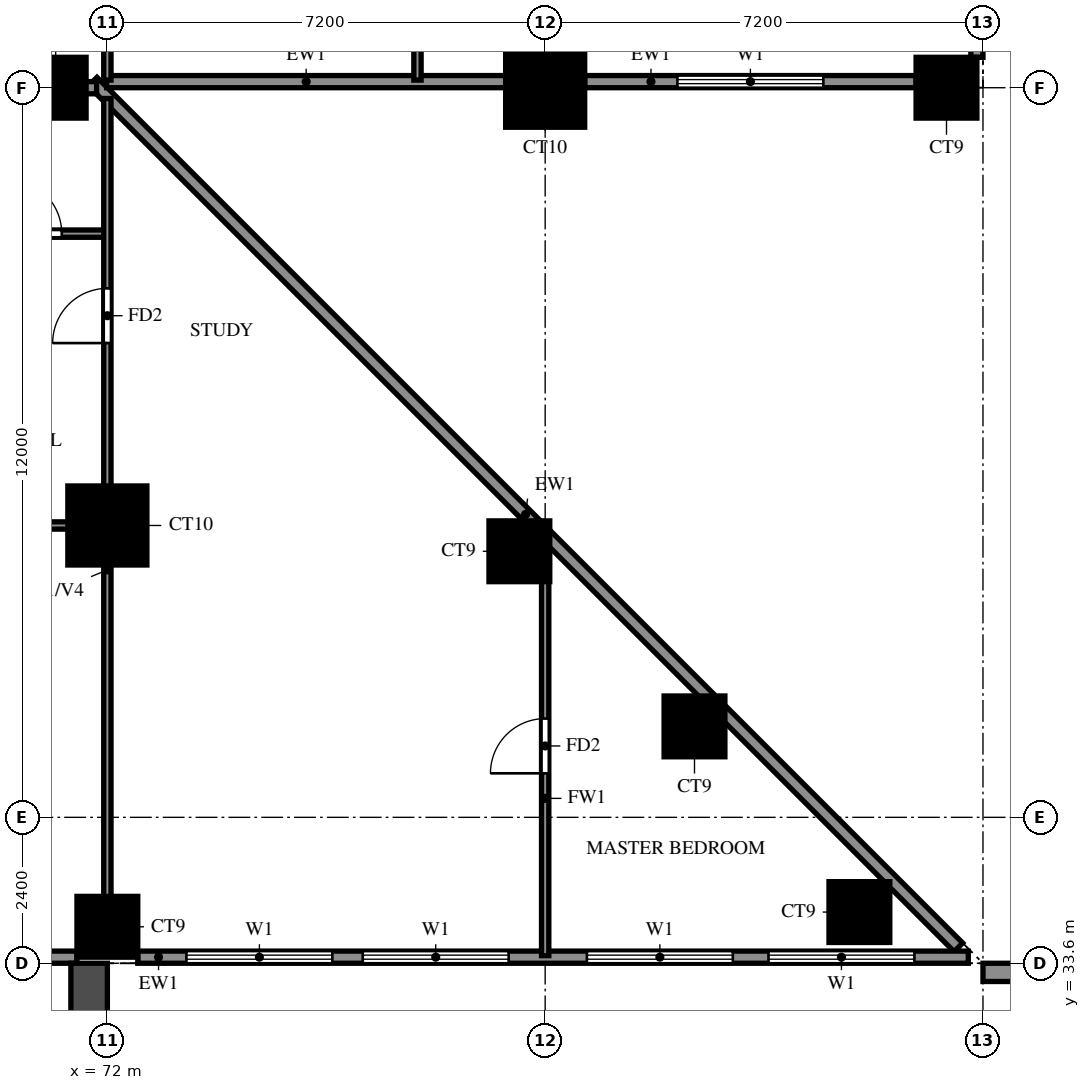
"""IFC4 building model, lengths in metres.
Left out: names, types, materials, properties, quantities, classifications, styles, units other than length and angle.
Written with IfcOpenShell. Run it as: python <this file> out.ifc"""

import sys

from ifc_helpers import new_model, si_unit, direction, frame, frame_2d, origin, origin_2d, place, context, subcontext, project, spatial, rectangle, extrude, source, transform, mapped, element, fill, save


model = new_model("IFC4")
c1 = context("Model", 3, precision=1e-05, world=origin(), true_north=direction((0.0, 1.0)))
c2 = subcontext(c1, "Body", "Model", "MODEL_VIEW")
j1 = project(units=[si_unit("LENGTHUNIT", "METRE"), si_unit("PLANEANGLEUNIT", "RADIAN")], contexts=[c1])
p1 = place(None, origin())
s1 = spatial("IfcSite", under=j1, at=p1, CompositionType="ELEMENT")
p2 = place(p1, origin())
s2 = spatial("IfcBuilding", under=s1, at=p2, CompositionType="ELEMENT")
p3 = place(p2, frame((0.0, 0.0, 65.5)))
s3 = spatial("IfcBuildingStorey", under=s2, at=p3, CompositionType="ELEMENT", Elevation=65.5)
m1 = source(origin(), c2, "Body", "SweptSolid", [
    extrude(rectangle(XDim=1.0, YDim=1.0, at=origin_2d()), origin(), (0.0, 0.0, 1.0), 3.18),
])
for number, where, z_axis, x_axis in (
    (1, (72.0, 34.2, 0.0), (0.0, 0.0, 1.0), (1.0, 0.0, 0.0)),
    (2, (84.367, 34.442, 0.0), (0.0, 0.0, 1.0), (1.0, 0.0, 0.0)),
    (3, (81.656, 37.496, 0.0), (0.0, 0.0, 1.0), (1.0, 0.0, 0.0)),
    (4, (78.776, 40.376, 0.0), (0.0, 0.0, 1.0), (1.0, 0.0, 0.0)),
):
    element("IfcColumn", number, at=place(p3, frame(where, z_axis=z_axis, x_axis=x_axis)), inside=s3, PredefinedType="COLUMN", context=c2, shape_type="MappedRepresentation", body=[
        mapped(m1, transform((0.0, 0.0, 0.0))),
    ])
m2 = source(origin(), c2, "Body", "SweptSolid", [
    extrude(rectangle(XDim=1.3, YDim=1.3, at=origin_2d()), origin(), (0.0, 0.0, 1.0), 3.18),
])
p4 = place(p3, frame((72.0, 40.8, 0.0), z_axis=(0.0, 0.0, 1.0), x_axis=(1.0, 0.0, 0.0)))
e5 = element("IfcColumn", 5, at=p4, inside=s3, PredefinedType="COLUMN", context=c2, shape_type="MappedRepresentation", body=[
    mapped(m2, transform((0.0, 0.0, 0.0))),
])
p5 = place(p3, frame((71.15, 48.0, 0.0), z_axis=(0.0, 0.0, 1.0), x_axis=(1.0, 0.0, 0.0)))
e6 = element("IfcColumn", 6, at=p5, inside=s3, PredefinedType="COLUMN", context=c2, shape_type="MappedRepresentation", body=[
    mapped(m1, transform((0.0, 0.0, 0.0))),
])
p6 = place(p3, frame((79.2, 48.0, 0.0), z_axis=(0.0, 0.0, 1.0), x_axis=(1.0, 0.0, 0.0)))
e7 = element("IfcColumn", 7, at=p6, inside=s3, PredefinedType="COLUMN", context=c2, shape_type="MappedRepresentation", body=[
    mapped(m2, transform((0.0, 0.0, 0.0))),
])
p7 = place(p3, frame((85.8, 48.0, 0.0), z_axis=(0.0, 0.0, 1.0), x_axis=(1.0, 0.0, 0.0)))
e8 = element("IfcColumn", 8, at=p7, inside=s3, PredefinedType="COLUMN", context=c2, shape_type="MappedRepresentation", body=[
    mapped(m1, transform((0.0, 0.0, 0.0))),
])
p8 = place(p3, frame((85.996, 33.863, 0.0), z_axis=(0.0, 0.0, 1.0), x_axis=(-0.707100718496, 0.707112843825, 0.0)))
e9 = element("IfcWall", 9, at=p8, inside=s3, PredefinedType="SOLIDWALL", context=c2, shape_type="SweptSolid", body=[
    extrude(rectangle(XDim=20.135, YDim=0.2, at=frame_2d((10.067, 0.0))), origin(), (0.0, 0.0, 1.0), 3.18),
])
p9 = place(p3, frame((71.989, 48.1, 0.0), z_axis=(0.0, 0.0, 1.0), x_axis=(1.0, 0.0, 0.0)))
e10 = element("IfcWall", 10, at=p9, inside=s3, PredefinedType="SOLIDWALL", context=c2, shape_type="SweptSolid", body=[
    extrude(rectangle(XDim=6.562, YDim=0.2, at=frame_2d((3.281, 0.0))), origin(), (0.0, 0.0, 1.0), 3.18),
])
p10 = place(p3, frame((79.85, 48.1, 0.0), z_axis=(0.0, 0.0, 1.0), x_axis=(1.0, 0.0, 0.0)))
e11 = element("IfcWall", 11, at=p10, inside=s3, PredefinedType="SOLIDWALL", context=c2, shape_type="SweptSolid", body=[
    extrude(rectangle(XDim=5.45, YDim=0.2, at=frame_2d((2.725, 0.0))), origin(), (0.0, 0.0, 1.0), 3.18),
])
p11 = place(p10, frame((1.525, 0.0, 0.6)))
e12 = element("IfcOpeningElement", 12, at=p11, cuts=e11, PredefinedType="OPENING", context=c2, shape_type="SweptSolid", body=[
    extrude(rectangle(XDim=2.4, YDim=2.4, at=frame_2d((1.2, 1.2))), frame((0.0, 0.11, 0.0), z_axis=(0.0, -1.0, 0.0), x_axis=(1.0, 0.0, 0.0)), (0.0, 0.0, 1.0), 0.22),
])
p12 = place(p3, frame((86.3, 48.5, 0.0), z_axis=(0.0, 0.0, 1.0), x_axis=(0.0, 1.0, 0.0)))
e13 = element("IfcWall", 13, at=p12, inside=s3, PredefinedType="SOLIDWALL", context=c2, shape_type="SweptSolid", body=[
    extrude(rectangle(XDim=6.2, YDim=0.2, at=frame_2d((3.1, 0.0))), origin(), (0.0, 0.0, 1.0), 3.18),
])
p13 = place(p12, frame((4.0, 0.0, 0.0)))
e14 = element("IfcOpeningElement", 14, at=p13, cuts=e13, PredefinedType="OPENING", context=c2, shape_type="SweptSolid", body=[
    extrude(rectangle(XDim=1.8, YDim=2.4, at=frame_2d((0.9, 1.2))), frame((0.0, 0.11, 0.0), z_axis=(0.0, -1.0, 0.0), x_axis=(1.0, 0.0, 0.0)), (0.0, 0.0, 1.0), 0.22),
])
p14 = place(p12, frame((0.45, 0.0, 0.6)))
e15 = element("IfcOpeningElement", 15, at=p14, cuts=e13, PredefinedType="OPENING", context=c2, shape_type="SweptSolid", body=[
    extrude(rectangle(XDim=1.2, YDim=2.4, at=frame_2d((0.6, 1.2))), frame((0.0, 0.11, 0.0), z_axis=(0.0, -1.0, 0.0), x_axis=(1.0, 0.0, 0.0)), (0.0, 0.0, 1.0), 0.22),
])
p15 = place(p3, frame((65.3, 33.7, 0.0), z_axis=(0.0, 0.0, 1.0), x_axis=(1.0, 0.0, 0.0)))
e16 = element("IfcWall", 16, at=p15, inside=s3, PredefinedType="SOLIDWALL", context=c2, shape_type="SweptSolid", body=[
    extrude(rectangle(XDim=6.2, YDim=0.2, at=frame_2d((3.1, 0.0))), origin(), (0.0, 0.0, 1.0), 3.18),
])
p16 = place(p15, frame((2.2, 0.0, 0.0)))
e17 = element("IfcOpeningElement", 17, at=p16, cuts=e16, PredefinedType="OPENING", context=c2, shape_type="SweptSolid", body=[
    extrude(rectangle(XDim=1.8, YDim=2.4, at=frame_2d((0.9, 1.2))), frame((0.0, 0.11, 0.0), z_axis=(0.0, -1.0, 0.0), x_axis=(1.0, 0.0, 0.0)), (0.0, 0.0, 1.0), 0.22),
])
p17 = place(p15, frame((0.45, 0.0, 0.6)))
e18 = element("IfcOpeningElement", 18, at=p17, cuts=e16, PredefinedType="OPENING", context=c2, shape_type="SweptSolid", body=[
    extrude(rectangle(XDim=1.2, YDim=2.4, at=frame_2d((0.6, 1.2))), frame((0.0, 0.11, 0.0), z_axis=(0.0, -1.0, 0.0), x_axis=(1.0, 0.0, 0.0)), (0.0, 0.0, 1.0), 0.22),
])
p18 = place(p15, frame((4.55, 0.0, 0.6)))
e19 = element("IfcOpeningElement", 19, at=p18, cuts=e16, PredefinedType="OPENING", context=c2, shape_type="SweptSolid", body=[
    extrude(rectangle(XDim=1.2, YDim=2.4, at=frame_2d((0.6, 1.2))), frame((0.0, 0.11, 0.0), z_axis=(0.0, -1.0, 0.0), x_axis=(1.0, 0.0, 0.0)), (0.0, 0.0, 1.0), 0.22),
])
p19 = place(p3, frame((72.5, 33.7, 0.0), z_axis=(0.0, 0.0, 1.0), x_axis=(1.0, 0.0, 0.0)))
e20 = element("IfcWall", 20, at=p19, inside=s3, PredefinedType="SOLIDWALL", context=c2, shape_type="SweptSolid", body=[
    extrude(rectangle(XDim=13.659, YDim=0.2, at=frame_2d((6.829, 0.0))), origin(), (0.0, 0.0, 1.0), 3.18),
])
p20 = place(p19, frame((0.8, 0.0, 0.6)))
e21 = element("IfcOpeningElement", 21, at=p20, cuts=e20, PredefinedType="OPENING", context=c2, shape_type="SweptSolid", body=[
    extrude(rectangle(XDim=2.4, YDim=2.4, at=frame_2d((1.2, 1.2))), frame((0.0, 0.11, 0.0), z_axis=(0.0, -1.0, 0.0), x_axis=(1.0, 0.0, 0.0)), (0.0, 0.0, 1.0), 0.22),
])
p21 = place(p19, frame((3.7, 0.0, 0.6)))
e22 = element("IfcOpeningElement", 22, at=p21, cuts=e20, PredefinedType="OPENING", context=c2, shape_type="SweptSolid", body=[
    extrude(rectangle(XDim=2.4, YDim=2.4, at=frame_2d((1.2, 1.2))), frame((0.0, 0.11, 0.0), z_axis=(0.0, -1.0, 0.0), x_axis=(1.0, 0.0, 0.0)), (0.0, 0.0, 1.0), 0.22),
])
p22 = place(p19, frame((7.386, 0.0, 0.6)))
e23 = element("IfcOpeningElement", 23, at=p22, cuts=e20, PredefinedType="OPENING", context=c2, shape_type="SweptSolid", body=[
    extrude(rectangle(XDim=2.4, YDim=2.4, at=frame_2d((1.2, 1.2))), frame((0.0, 0.11, 0.0), z_axis=(0.0, -1.0, 0.0), x_axis=(1.0, 0.0, 0.0)), (0.0, 0.0, 1.0), 0.22),
])
p23 = place(p19, frame((10.372, 0.0, 0.6)))
e24 = element("IfcOpeningElement", 24, at=p23, cuts=e20, PredefinedType="OPENING", context=c2, shape_type="SweptSolid", body=[
    extrude(rectangle(XDim=2.4, YDim=2.4, at=frame_2d((1.2, 1.2))), frame((0.0, 0.11, 0.0), z_axis=(0.0, -1.0, 0.0), x_axis=(1.0, 0.0, 0.0)), (0.0, 0.0, 1.0), 0.22),
])
p24 = place(p3, frame((86.4, 33.45, -0.32), z_axis=(0.0, 0.0, 1.0), x_axis=(1.0, 0.0, 0.0)))
e25 = element("IfcWall", 25, at=p24, inside=s3, PredefinedType="SOLIDWALL", context=c2, shape_type="SweptSolid", body=[
    extrude(rectangle(XDim=2.4, YDim=0.3, at=frame_2d((1.2, 0.0))), origin(), (0.0, 0.0, 1.0), 3.5),
])
p25 = place(p3, frame((71.7, 33.6, 0.0), z_axis=(0.0, 0.0, 1.0), x_axis=(0.0, -1.0, 0.0)))
e26 = element("IfcWall", 26, at=p25, inside=s3, PredefinedType="SOLIDWALL", context=c2, shape_type="SweptSolid", body=[
    extrude(rectangle(XDim=2.7, YDim=0.6, at=frame_2d((1.35, 0.0))), origin(), (0.0, 0.0, 1.0), 2.85),
])
p26 = place(p3, frame((67.2, 48.0, 0.0), z_axis=(0.0, 0.0, 1.0), x_axis=(1.0, 0.0, 0.0)))
e27 = element("IfcWall", 27, at=p26, inside=s3, PredefinedType="SOLIDWALL", context=c2, shape_type="SweptSolid", body=[
    extrude(rectangle(XDim=4.623, YDim=0.2, at=frame_2d((2.312, 0.0))), origin(), (0.0, 0.0, 1.0), 3.18),
])
p27 = place(p3, frame((60.0, 40.8, 0.0), z_axis=(0.0, 0.0, 1.0), x_axis=(1.0, 0.0, 0.0)))
e28 = element("IfcWall", 28, at=p27, inside=s3, PredefinedType="PARTITIONING", context=c2, shape_type="SweptSolid", body=[
    extrude(rectangle(XDim=12.0, YDim=0.12, at=frame_2d((6.0, 0.0))), origin(), (0.0, 0.0, 1.0), 3.18),
])
p28 = place(p27, frame((7.65, 0.0, 0.0)))
e29 = element("IfcOpeningElement", 29, at=p28, cuts=e28, PredefinedType="OPENING", context=c2, shape_type="SweptSolid", body=[
    extrude(rectangle(XDim=1.5, YDim=2.1, at=frame_2d((0.75, 1.05))), frame((0.0, 0.07, 0.0), z_axis=(0.0, -1.0, 0.0), x_axis=(1.0, 0.0, 0.0)), (0.0, 0.0, 1.0), 0.14),
])
p29 = place(p27, frame((1.95, 0.0, 0.0)))
e30 = element("IfcOpeningElement", 30, at=p29, cuts=e28, PredefinedType="OPENING", context=c2, shape_type="SweptSolid", body=[
    extrude(rectangle(XDim=0.9, YDim=2.1, at=frame_2d((0.45, 1.05))), frame((0.0, 0.07, 0.0), z_axis=(0.0, -1.0, 0.0), x_axis=(1.0, 0.0, 0.0)), (0.0, 0.0, 1.0), 0.14),
])
p30 = place(p3, frame((67.2, 45.6, 0.0), z_axis=(0.0, 0.0, 1.0), x_axis=(1.0, 0.0, 0.0)))
e31 = element("IfcWall", 31, at=p30, inside=s3, PredefinedType="PARTITIONING", context=c2, shape_type="SweptSolid", body=[
    extrude(rectangle(XDim=4.8, YDim=0.12, at=frame_2d((2.4, 0.0))), origin(), (0.0, 0.0, 1.0), 3.18),
])
p31 = place(p30, frame((3.15, 0.0, 0.0)))
e32 = element("IfcOpeningElement", 32, at=p31, cuts=e31, PredefinedType="OPENING", context=c2, shape_type="SweptSolid", body=[
    extrude(rectangle(XDim=0.9, YDim=2.1, at=frame_2d((0.45, 1.05))), frame((0.0, 0.07, 0.0), z_axis=(0.0, -1.0, 0.0), x_axis=(1.0, 0.0, 0.0)), (0.0, 0.0, 1.0), 0.14),
])
p32 = place(p3, frame((72.0, 33.725, 0.0), z_axis=(0.0, 0.0, 1.0), x_axis=(0.0, 1.0, 0.0)))
e33 = element("IfcWall", 33, at=p32, inside=s3, PredefinedType="PARTITIONING", context=c2, shape_type="SweptSolid", body=[
    extrude(rectangle(XDim=14.098, YDim=0.12, at=frame_2d((7.049, 0.0))), origin(), (0.0, 0.0, 1.0), 2.28),
])
p33 = place(p32, frame((10.075, 0.0, 0.0)))
e34 = element("IfcOpeningElement", 34, at=p33, cuts=e33, PredefinedType="OPENING", context=c2, shape_type="SweptSolid", body=[
    extrude(rectangle(XDim=0.9, YDim=2.1, at=frame_2d((0.45, 1.05))), frame((0.0, 0.07, 0.0), z_axis=(0.0, -1.0, 0.0), x_axis=(1.0, 0.0, 0.0)), (0.0, 0.0, 1.0), 0.14),
])
p34 = place(p3, frame((72.0, 48.125, 0.0), z_axis=(0.0, 0.0, 1.0), x_axis=(0.0, 1.0, 0.0)))
e35 = element("IfcWall", 35, at=p34, inside=s3, PredefinedType="PARTITIONING", context=c2, shape_type="SweptSolid", body=[
    extrude(rectangle(XDim=7.075, YDim=0.12, at=frame_2d((3.538, 0.0))), origin(), (0.0, 0.0, 1.0), 3.18),
])
p35 = place(p3, frame((77.1, 48.125, 0.0), z_axis=(0.0, 0.0, 1.0), x_axis=(0.0, 1.0, 0.0)))
e36 = element("IfcWall", 36, at=p35, inside=s3, PredefinedType="PARTITIONING", context=c2, shape_type="SweptSolid", body=[
    extrude(rectangle(XDim=7.075, YDim=0.12, at=frame_2d((3.538, 0.0))), origin(), (0.0, 0.0, 1.0), 3.18),
])
p36 = place(p35, frame((3.087, 0.0, 0.0)))
e37 = element("IfcOpeningElement", 37, at=p36, cuts=e36, PredefinedType="OPENING", context=c2, shape_type="SweptSolid", body=[
    extrude(rectangle(XDim=0.9, YDim=2.1, at=frame_2d((0.45, 1.05))), frame((0.0, 0.07, 0.0), z_axis=(0.0, -1.0, 0.0), x_axis=(1.0, 0.0, 0.0)), (0.0, 0.0, 1.0), 0.14),
])
p37 = place(p3, frame((79.2, 33.725, 0.0), z_axis=(0.0, 0.0, 1.0), x_axis=(0.0, 1.0, 0.0)))
e38 = element("IfcWall", 38, at=p37, inside=s3, PredefinedType="PARTITIONING", context=c2, shape_type="SweptSolid", body=[
    extrude(rectangle(XDim=6.898, YDim=0.12, at=frame_2d((3.449, 0.0))), origin(), (0.0, 0.0, 1.0), 3.18),
])
p38 = place(p37, frame((2.999, 0.0, 0.0)))
e39 = element("IfcOpeningElement", 39, at=p38, cuts=e38, PredefinedType="OPENING", context=c2, shape_type="SweptSolid", body=[
    extrude(rectangle(XDim=0.9, YDim=2.1, at=frame_2d((0.45, 1.05))), frame((0.0, 0.07, 0.0), z_axis=(0.0, -1.0, 0.0), x_axis=(1.0, 0.0, 0.0)), (0.0, 0.0, 1.0), 0.14),
])
p39 = place(p3, frame((79.2, 48.125, 0.0), z_axis=(0.0, 0.0, 1.0), x_axis=(0.0, 1.0, 0.0)))
e40 = element("IfcWall", 40, at=p39, inside=s3, PredefinedType="PARTITIONING", context=c2, shape_type="SweptSolid", body=[
    extrude(rectangle(XDim=21.475, YDim=0.12, at=frame_2d((10.738, 0.0))), origin(), (0.0, 0.0, 1.0), 3.18),
])
p40 = place(p39, frame((1.288, 0.0, 0.0)))
e41 = element("IfcOpeningElement", 41, at=p40, cuts=e40, PredefinedType="OPENING", context=c2, shape_type="SweptSolid", body=[
    extrude(rectangle(XDim=0.9, YDim=2.1, at=frame_2d((0.45, 1.05))), frame((0.0, 0.07, 0.0), z_axis=(0.0, -1.0, 0.0), x_axis=(1.0, 0.0, 0.0)), (0.0, 0.0, 1.0), 0.14),
])
p41 = place(p39, frame((4.825, 0.0, 0.0)))
e42 = element("IfcOpeningElement", 42, at=p41, cuts=e40, PredefinedType="OPENING", context=c2, shape_type="SweptSolid", body=[
    extrude(rectangle(XDim=0.9, YDim=2.1, at=frame_2d((0.45, 1.05))), frame((0.0, 0.07, 0.0), z_axis=(0.0, -1.0, 0.0), x_axis=(1.0, 0.0, 0.0)), (0.0, 0.0, 1.0), 0.14),
])
p42 = place(p39, frame((9.925, 0.0, 0.0)))
e43 = element("IfcOpeningElement", 43, at=p42, cuts=e40, PredefinedType="OPENING", context=c2, shape_type="SweptSolid", body=[
    extrude(rectangle(XDim=1.5, YDim=2.1, at=frame_2d((0.75, 1.05))), frame((0.0, 0.07, 0.0), z_axis=(0.0, -1.0, 0.0), x_axis=(1.0, 0.0, 0.0)), (0.0, 0.0, 1.0), 0.14),
])
p43 = place(p39, frame((15.625, 0.0, 0.0)))
e44 = element("IfcOpeningElement", 44, at=p43, cuts=e40, PredefinedType="OPENING", context=c2, shape_type="SweptSolid", body=[
    extrude(rectangle(XDim=0.9, YDim=2.1, at=frame_2d((0.45, 1.05))), frame((0.0, 0.07, 0.0), z_axis=(0.0, -1.0, 0.0), x_axis=(1.0, 0.0, 0.0)), (0.0, 0.0, 1.0), 0.14),
])
p44 = place(p39, frame((19.225, 0.0, 0.0)))
e45 = element("IfcOpeningElement", 45, at=p44, cuts=e40, PredefinedType="OPENING", context=c2, shape_type="SweptSolid", body=[
    extrude(rectangle(XDim=0.9, YDim=2.1, at=frame_2d((0.45, 1.05))), frame((0.0, 0.07, 0.0), z_axis=(0.0, -1.0, 0.0), x_axis=(1.0, 0.0, 0.0)), (0.0, 0.0, 1.0), 0.14),
])
p45 = place(p11, origin())
e46 = element("IfcWindow", 46, at=p45, inside=s3, PartitioningType="DOUBLE_PANEL_VERTICAL", PredefinedType="WINDOW", context=c2, shape_type="SweptSolid", body=[
    extrude(rectangle(XDim=2.4, YDim=2.4, at=frame_2d((1.2, 1.2))), frame((0.0, 0.03, 0.0), z_axis=(0.0, -1.0, 0.0), x_axis=(1.0, 0.0, 0.0)), (0.0, 0.0, 1.0), 0.06),
])
fill(e12, e46)
p46 = place(p20, origin())
e47 = element("IfcWindow", 47, at=p46, inside=s3, PartitioningType="DOUBLE_PANEL_VERTICAL", PredefinedType="WINDOW", context=c2, shape_type="SweptSolid", body=[
    extrude(rectangle(XDim=2.4, YDim=2.4, at=frame_2d((1.2, 1.2))), frame((0.0, 0.03, 0.0), z_axis=(0.0, -1.0, 0.0), x_axis=(1.0, 0.0, 0.0)), (0.0, 0.0, 1.0), 0.06),
])
fill(e21, e47)
p47 = place(p21, origin())
e48 = element("IfcWindow", 48, at=p47, inside=s3, PartitioningType="DOUBLE_PANEL_VERTICAL", PredefinedType="WINDOW", context=c2, shape_type="SweptSolid", body=[
    extrude(rectangle(XDim=2.4, YDim=2.4, at=frame_2d((1.2, 1.2))), frame((0.0, 0.03, 0.0), z_axis=(0.0, -1.0, 0.0), x_axis=(1.0, 0.0, 0.0)), (0.0, 0.0, 1.0), 0.06),
])
fill(e22, e48)
p48 = place(p22, origin())
e49 = element("IfcWindow", 49, at=p48, inside=s3, PartitioningType="DOUBLE_PANEL_VERTICAL", PredefinedType="WINDOW", context=c2, shape_type="SweptSolid", body=[
    extrude(rectangle(XDim=2.4, YDim=2.4, at=frame_2d((1.2, 1.2))), frame((0.0, 0.03, 0.0), z_axis=(0.0, -1.0, 0.0), x_axis=(1.0, 0.0, 0.0)), (0.0, 0.0, 1.0), 0.06),
])
fill(e23, e49)
p49 = place(p23, origin())
e50 = element("IfcWindow", 50, at=p49, inside=s3, PartitioningType="DOUBLE_PANEL_VERTICAL", PredefinedType="WINDOW", context=c2, shape_type="SweptSolid", body=[
    extrude(rectangle(XDim=2.4, YDim=2.4, at=frame_2d((1.2, 1.2))), frame((0.0, 0.03, 0.0), z_axis=(0.0, -1.0, 0.0), x_axis=(1.0, 0.0, 0.0)), (0.0, 0.0, 1.0), 0.06),
])
fill(e24, e50)
p50 = place(p31, origin())
e51 = element("IfcDoor", 51, at=p50, inside=s3, OperationType="SINGLE_SWING_LEFT", PredefinedType="DOOR", context=c2, shape_type="SweptSolid", body=[
    extrude(rectangle(XDim=0.9, YDim=2.1, at=frame_2d((0.45, 1.05))), frame((0.0, 0.025, 0.0), z_axis=(0.0, -1.0, 0.0), x_axis=(1.0, 0.0, 0.0)), (0.0, 0.0, 1.0), 0.05),
])
fill(e32, e51)
p51 = place(p33, origin())
e52 = element("IfcDoor", 52, at=p51, inside=s3, OperationType="SINGLE_SWING_RIGHT", PredefinedType="DOOR", context=c2, shape_type="SweptSolid", body=[
    extrude(rectangle(XDim=0.9, YDim=2.1, at=frame_2d((0.45, 1.05))), frame((0.0, 0.025, 0.0), z_axis=(0.0, -1.0, 0.0), x_axis=(1.0, 0.0, 0.0)), (0.0, 0.0, 1.0), 0.05),
])
fill(e34, e52)
p52 = place(p38, origin())
e53 = element("IfcDoor", 53, at=p52, inside=s3, OperationType="SINGLE_SWING_LEFT", PredefinedType="DOOR", context=c2, shape_type="SweptSolid", body=[
    extrude(rectangle(XDim=0.9, YDim=2.1, at=frame_2d((0.45, 1.05))), frame((0.0, 0.025, 0.0), z_axis=(0.0, -1.0, 0.0), x_axis=(1.0, 0.0, 0.0)), (0.0, 0.0, 1.0), 0.05),
])
fill(e39, e53)
save(model, sys.argv[1])
